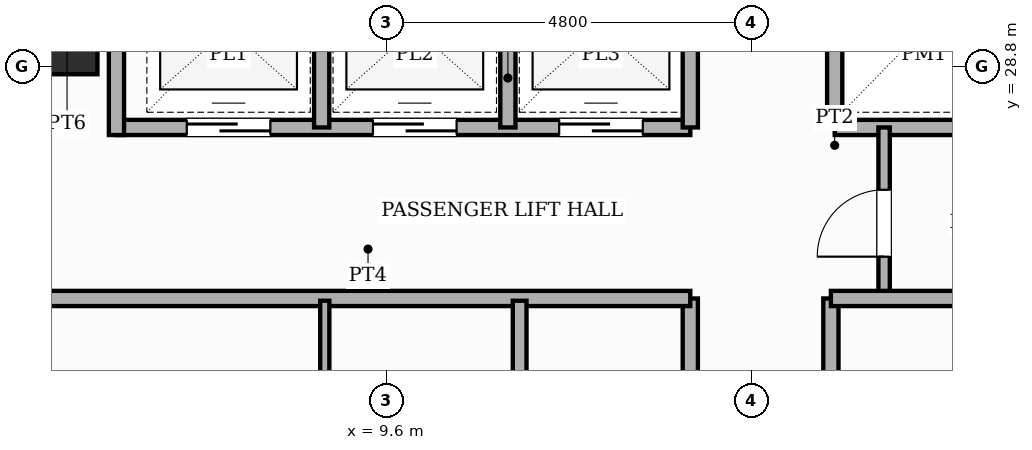
"""IFC4 building model, lengths in metres.
Left out: names, types, materials, properties, quantities, classifications, styles, units other than length and angle.
Written with IfcOpenShell. Run it as: python <this file> out.ifc"""

import sys

from ifc_helpers import new_model, si_unit, direction, frame, frame_2d, origin, origin_2d, place, context, subcontext, project, spatial, rectangle, extrude, element, fill, save


model = new_model("IFC4")
c1 = context("Model", 3, precision=1e-05, world=origin(), true_north=direction((0.0, 1.0)))
c2 = subcontext(c1, "Body", "Model", "MODEL_VIEW")
j1 = project(units=[si_unit("LENGTHUNIT", "METRE"), si_unit("PLANEANGLEUNIT", "RADIAN")], contexts=[c1])
p1 = place(None, origin())
s1 = spatial("IfcSite", under=j1, at=p1, CompositionType="ELEMENT")
p2 = place(p1, origin())
s2 = spatial("IfcBuilding", under=s1, at=p2, CompositionType="ELEMENT")
p3 = place(p2, frame((0.0, 0.0, 25.0)))
s3 = spatial("IfcBuildingStorey", under=s2, at=p3, CompositionType="ELEMENT", Elevation=25.0)
p4 = place(p3, frame((5.25, 29.25, 0.0), z_axis=(0.0, 0.0, 1.0), x_axis=(1.0, 0.0, 0.0)))
e1 = element("IfcColumn", 1, at=p4, inside=s3, PredefinedType="COLUMN", context=c2, shape_type="SweptSolid", body=[
    extrude(rectangle(XDim=1.1, YDim=1.1, at=origin_2d()), origin(), (0.0, 0.0, 1.0), 3.6),
])
p5 = place(p3, frame((6.05, 28.0, 0.0), z_axis=(0.0, 0.0, 1.0), x_axis=(1.0, 0.0, 0.0)))
e2 = element("IfcWall", 2, at=p5, inside=s3, PredefinedType="POLYGONAL", context=c2, shape_type="SweptSolid", body=[
    extrude(rectangle(XDim=7.55, YDim=0.2, at=frame_2d((3.775, 0.0))), origin(), (0.0, 0.0, 1.0), 3.35),
])
p6 = place(p5, frame((0.925, 0.0, 0.0)))
e3 = element("IfcOpeningElement", 3, at=p6, cuts=e2, PredefinedType="OPENING", context=c2, shape_type="SweptSolid", body=[
    extrude(rectangle(XDim=1.1, YDim=2.15, at=frame_2d((0.55, 1.075))), frame((0.0, 0.11, 0.0), z_axis=(0.0, -1.0, 0.0), x_axis=(1.0, 0.0, 0.0)), (0.0, 0.0, 1.0), 0.22),
])
p7 = place(p5, frame((3.375, 0.0, 0.0)))
e4 = element("IfcOpeningElement", 4, at=p7, cuts=e2, PredefinedType="OPENING", context=c2, shape_type="SweptSolid", body=[
    extrude(rectangle(XDim=1.1, YDim=2.15, at=frame_2d((0.55, 1.075))), frame((0.0, 0.11, 0.0), z_axis=(0.0, -1.0, 0.0), x_axis=(1.0, 0.0, 0.0)), (0.0, 0.0, 1.0), 0.22),
])
p8 = place(p5, frame((5.825, 0.0, 0.0)))
e5 = element("IfcOpeningElement", 5, at=p8, cuts=e2, PredefinedType="OPENING", context=c2, shape_type="SweptSolid", body=[
    extrude(rectangle(XDim=1.1, YDim=2.15, at=frame_2d((0.55, 1.075))), frame((0.0, 0.11, 0.0), z_axis=(0.0, -1.0, 0.0), x_axis=(1.0, 0.0, 0.0)), (0.0, 0.0, 1.0), 0.22),
])
p9 = place(p3, frame((15.5, 28.0, 0.0), z_axis=(0.0, 0.0, 1.0), x_axis=(1.0, 0.0, 0.0)))
e6 = element("IfcWall", 6, at=p9, inside=s3, PredefinedType="POLYGONAL", context=c2, shape_type="SweptSolid", body=[
    extrude(rectangle(XDim=7.25, YDim=0.2, at=frame_2d((3.625, 0.0))), origin(), (0.0, 0.0, 1.0), 3.35),
])
p10 = place(p3, frame((6.05, 27.9, 0.0), z_axis=(0.0, 0.0, 1.0), x_axis=(0.0, 1.0, 0.0)))
e7 = element("IfcWall", 7, at=p10, inside=s3, PredefinedType="POLYGONAL", context=c2, shape_type="SweptSolid", body=[
    extrude(rectangle(XDim=3.0, YDim=0.2, at=frame_2d((1.5, 0.0))), origin(), (0.0, 0.0, 1.0), 3.35),
])
for number, where, z_axis, x_axis in (
    (8, (13.6, 28.0, 0.0), (0.0, 0.0, 1.0), (0.0, 1.0, 0.0)),
    (9, (15.5, 28.0, 0.0), (0.0, 0.0, 1.0), (0.0, 1.0, 0.0)),
    (10, (8.75, 28.0, 0.0), (0.0, 0.0, 1.0), (0.0, 1.0, 0.0)),
    (11, (11.2, 28.0, 0.0), (0.0, 0.0, 1.0), (0.0, 1.0, 0.0)),
):
    element("IfcWall", number, at=place(p3, frame(where, z_axis=z_axis, x_axis=x_axis)), inside=s3, PredefinedType="POLYGONAL", context=c2, shape_type="SweptSolid", body=[
        extrude(rectangle(XDim=2.9, YDim=0.2, at=frame_2d((1.45, 0.0))), origin(), (0.0, 0.0, 1.0), 3.35),
    ])
p11 = place(p3, frame((16.15, 25.75, 0.0), z_axis=(0.0, 0.0, 1.0), x_axis=(0.0, 1.0, 0.0)))
e12 = element("IfcWall", 12, at=p11, inside=s3, PredefinedType="PARTITIONING", context=c2, shape_type="SweptSolid", body=[
    extrude(rectangle(XDim=2.25, YDim=0.15, at=frame_2d((1.125, 0.0))), origin(), (0.0, 0.0, 1.0), 3.35),
])
p12 = place(p11, frame((0.55, 0.0, 0.0)))
e13 = element("IfcOpeningElement", 13, at=p12, cuts=e12, PredefinedType="OPENING", context=c2, shape_type="SweptSolid", body=[
    extrude(rectangle(XDim=0.88, YDim=2.1, at=frame_2d((0.44, 1.05))), frame((0.0, 0.085, 0.0), z_axis=(0.0, -1.0, 0.0), x_axis=(1.0, 0.0, 0.0)), (0.0, 0.0, 1.0), 0.17),
])
p13 = place(p3, frame((13.6, 5.12, 0.0), z_axis=(0.0, 0.0, 1.0), x_axis=(0.0, 1.0, 0.0)))
e14 = element("IfcWall", 14, at=p13, inside=s3, PredefinedType="PARTITIONING", context=c2, shape_type="SweptSolid", body=[
    extrude(rectangle(XDim=20.63, YDim=0.2, at=frame_2d((10.315, 0.0))), origin(), (0.0, 0.0, 1.0), 3.35),
])
p14 = place(p13, frame((1.025, 0.0, 0.0)))
e15 = element("IfcOpeningElement", 15, at=p14, cuts=e14, PredefinedType="OPENING", context=c2, shape_type="SweptSolid", body=[
    extrude(rectangle(XDim=0.98, YDim=2.18, at=frame_2d((0.49, 1.09))), frame((0.0, 0.11, 0.0), z_axis=(0.0, -1.0, 0.0), x_axis=(1.0, 0.0, 0.0)), (0.0, 0.0, 1.0), 0.22),
])
p15 = place(p13, frame((8.39, 0.0, 0.0)))
e16 = element("IfcOpeningElement", 16, at=p15, cuts=e14, PredefinedType="OPENING", context=c2, shape_type="SweptSolid", body=[
    extrude(rectangle(XDim=0.98, YDim=2.18, at=frame_2d((0.49, 1.09))), frame((0.0, 0.11, 0.0), z_axis=(0.0, -1.0, 0.0), x_axis=(1.0, 0.0, 0.0)), (0.0, 0.0, 1.0), 0.22),
])
p16 = place(p13, frame((14.71, 0.0, 0.0)))
e17 = element("IfcOpeningElement", 17, at=p16, cuts=e14, PredefinedType="OPENING", context=c2, shape_type="SweptSolid", body=[
    extrude(rectangle(XDim=0.98, YDim=2.18, at=frame_2d((0.49, 1.09))), frame((0.0, 0.11, 0.0), z_axis=(0.0, -1.0, 0.0), x_axis=(1.0, 0.0, 0.0)), (0.0, 0.0, 1.0), 0.22),
])
p17 = place(p3, frame((15.45, 5.12, 0.0), z_axis=(0.0, 0.0, 1.0), x_axis=(0.0, 1.0, 0.0)))
e18 = element("IfcWall", 18, at=p17, inside=s3, PredefinedType="PARTITIONING", context=c2, shape_type="SweptSolid", body=[
    extrude(rectangle(XDim=20.63, YDim=0.2, at=frame_2d((10.315, 0.0))), origin(), (0.0, 0.0, 1.0), 3.35),
])
p18 = place(p17, frame((1.025, 0.0, 0.0)))
e19 = element("IfcOpeningElement", 19, at=p18, cuts=e18, PredefinedType="OPENING", context=c2, shape_type="SweptSolid", body=[
    extrude(rectangle(XDim=0.98, YDim=2.18, at=frame_2d((0.49, 1.09))), frame((0.0, 0.11, 0.0), z_axis=(0.0, -1.0, 0.0), x_axis=(1.0, 0.0, 0.0)), (0.0, 0.0, 1.0), 0.22),
])
p19 = place(p17, frame((8.39, 0.0, 0.0)))
e20 = element("IfcOpeningElement", 20, at=p19, cuts=e18, PredefinedType="OPENING", context=c2, shape_type="SweptSolid", body=[
    extrude(rectangle(XDim=0.98, YDim=2.18, at=frame_2d((0.49, 1.09))), frame((0.0, 0.11, 0.0), z_axis=(0.0, -1.0, 0.0), x_axis=(1.0, 0.0, 0.0)), (0.0, 0.0, 1.0), 0.22),
])
p20 = place(p17, frame((14.71, 0.0, 0.0)))
e21 = element("IfcOpeningElement", 21, at=p20, cuts=e18, PredefinedType="OPENING", context=c2, shape_type="SweptSolid", body=[
    extrude(rectangle(XDim=0.98, YDim=2.18, at=frame_2d((0.49, 1.09))), frame((0.0, 0.11, 0.0), z_axis=(0.0, -1.0, 0.0), x_axis=(1.0, 0.0, 0.0)), (0.0, 0.0, 1.0), 0.22),
])
p21 = place(p3, frame((5.12, 25.75, 0.0), z_axis=(0.0, 0.0, 1.0), x_axis=(1.0, 0.0, 0.0)))
e22 = element("IfcWall", 22, at=p21, inside=s3, PredefinedType="PARTITIONING", context=c2, shape_type="SweptSolid", body=[
    extrude(rectangle(XDim=8.48, YDim=0.2, at=frame_2d((4.24, 0.0))), origin(), (0.0, 0.0, 1.0), 3.35),
])
p22 = place(p3, frame((15.45, 25.75, 0.0), z_axis=(0.0, 0.0, 1.0), x_axis=(1.0, 0.0, 0.0)))
e23 = element("IfcWall", 23, at=p22, inside=s3, PredefinedType="PARTITIONING", context=c2, shape_type="SweptSolid", body=[
    extrude(rectangle(XDim=8.23, YDim=0.2, at=frame_2d((4.115, 0.0))), origin(), (0.0, 0.0, 1.0), 3.35),
])
p23 = place(p3, frame((8.791, 22.0, 0.0), z_axis=(0.0, 0.0, 1.0), x_axis=(0.0, 1.0, 0.0)))
e24 = element("IfcWall", 24, at=p23, inside=s3, PredefinedType="PARTITIONING", context=c2, shape_type="SweptSolid", body=[
    extrude(rectangle(XDim=3.72, YDim=0.12, at=frame_2d((1.86, 0.0))), origin(), (0.0, 0.0, 1.0), 3.35),
])
p24 = place(p3, frame((11.355, 22.0, 0.0), z_axis=(0.0, 0.0, 1.0), x_axis=(0.0, 1.0, 0.0)))
e25 = element("IfcWall", 25, at=p24, inside=s3, PredefinedType="PLUMBINGWALL", context=c2, shape_type="SweptSolid", body=[
    extrude(rectangle(XDim=3.72, YDim=0.18, at=frame_2d((1.86, 0.0))), origin(), (0.0, 0.0, 1.0), 3.35),
])
p25 = place(p6, origin())
e26 = element("IfcDoor", 26, at=p25, inside=s3, OperationType="SLIDING_TO_LEFT", PredefinedType="DOOR", context=c2, shape_type="SweptSolid", body=[
    extrude(rectangle(XDim=1.1, YDim=2.15, at=frame_2d((0.55, 1.075))), frame((0.0, 0.025, 0.0), z_axis=(0.0, -1.0, 0.0), x_axis=(1.0, 0.0, 0.0)), (0.0, 0.0, 1.0), 0.05),
])
fill(e3, e26)
p26 = place(p7, origin())
e27 = element("IfcDoor", 27, at=p26, inside=s3, OperationType="SLIDING_TO_RIGHT", PredefinedType="DOOR", context=c2, shape_type="SweptSolid", body=[
    extrude(rectangle(XDim=1.1, YDim=2.15, at=frame_2d((0.55, 1.075))), frame((0.0, 0.025, 0.0), z_axis=(0.0, -1.0, 0.0), x_axis=(1.0, 0.0, 0.0)), (0.0, 0.0, 1.0), 0.05),
])
fill(e4, e27)
p27 = place(p8, origin())
e28 = element("IfcDoor", 28, at=p27, inside=s3, OperationType="SLIDING_TO_LEFT", PredefinedType="DOOR", context=c2, shape_type="SweptSolid", body=[
    extrude(rectangle(XDim=1.1, YDim=2.15, at=frame_2d((0.55, 1.075))), frame((0.0, 0.025, 0.0), z_axis=(0.0, -1.0, 0.0), x_axis=(1.0, 0.0, 0.0)), (0.0, 0.0, 1.0), 0.05),
])
fill(e5, e28)
p28 = place(p12, origin())
e29 = element("IfcDoor", 29, at=p28, inside=s3, OperationType="SINGLE_SWING_LEFT", PredefinedType="DOOR", context=c2, shape_type="SweptSolid", body=[
    extrude(rectangle(XDim=0.88, YDim=2.1, at=frame_2d((0.44, 1.05))), frame((0.0, 0.025, 0.0), z_axis=(0.0, -1.0, 0.0), x_axis=(1.0, 0.0, 0.0)), (0.0, 0.0, 1.0), 0.05),
])
fill(e13, e29)
save(model, sys.argv[1])
